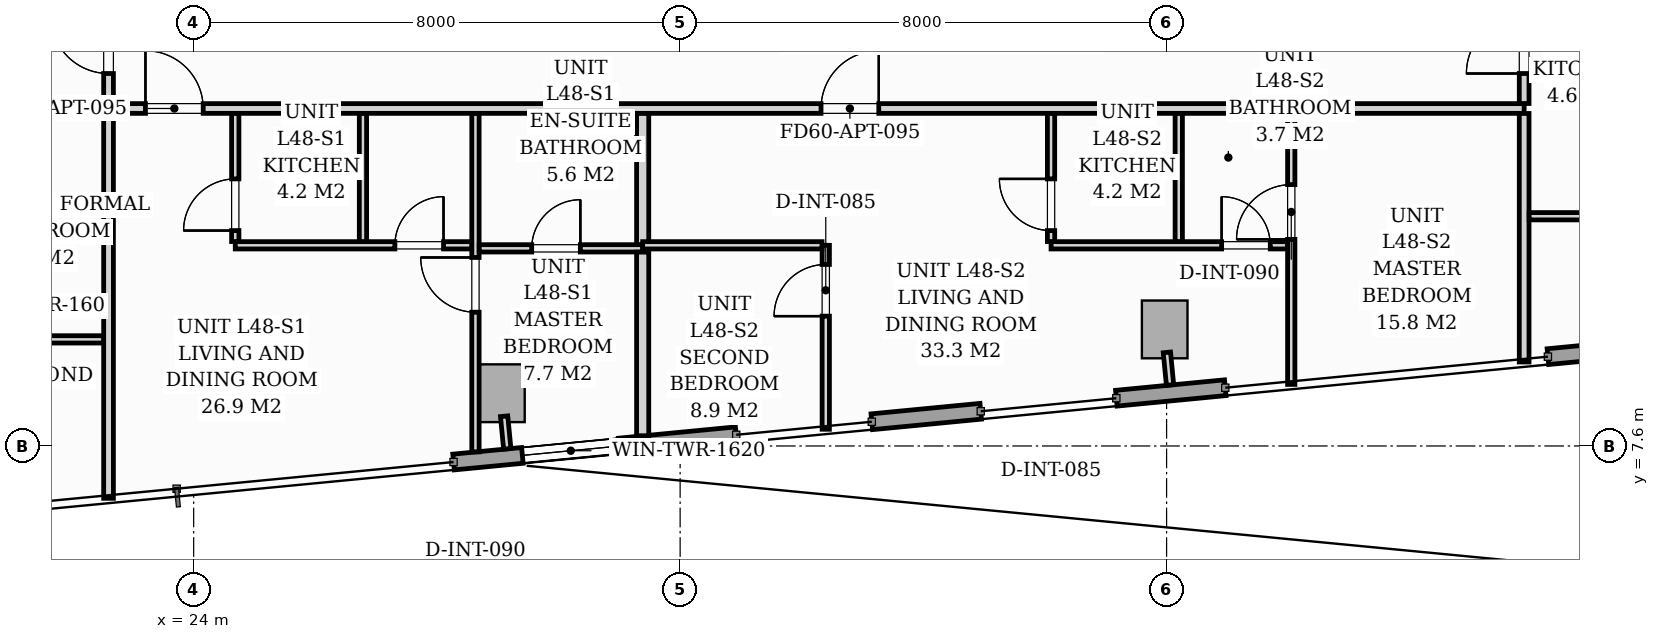
"""IFC4 building model, lengths in metres.
Left out: names, types, materials, properties, quantities, classifications, styles, units other than length and angle.
Written with IfcOpenShell. Run it as: python <this file> out.ifc"""

import sys

from ifc_helpers import new_model, si_unit, direction, frame, frame_2d, origin, origin_2d, place, context, subcontext, project, spatial, rectangle, extrude, source, transform, mapped, element, fill, save


model = new_model("IFC4")
c1 = context("Model", 3, precision=1e-05, world=origin(), true_north=direction((0.0, 1.0)))
c2 = subcontext(c1, "Body", "Model", "MODEL_VIEW")
j1 = project(units=[si_unit("LENGTHUNIT", "METRE"), si_unit("PLANEANGLEUNIT", "RADIAN")], contexts=[c1])
p1 = place(None, origin())
s1 = spatial("IfcSite", under=j1, at=p1, CompositionType="ELEMENT")
p2 = place(p1, origin())
s2 = spatial("IfcBuilding", under=s1, at=p2, CompositionType="ELEMENT")
p3 = place(p2, frame((0.0, 0.0, 167.8)))
s3 = spatial("IfcBuildingStorey", under=s2, at=p3, CompositionType="ELEMENT", Elevation=167.8)
m1 = source(origin(), c2, "Body", "SweptSolid", [
    extrude(rectangle(XDim=0.75, YDim=0.95, at=origin_2d()), origin(), (0.0, 0.0, 1.0), 5.194),
])
for number, where, z_axis, x_axis in (
    (1, (29.069, 8.467, 0.004), (0.0, 0.0, 1.0), (0.995, 0.096, 0.0)),
    (2, (39.969, 9.517, 0.004), (0.0, 0.0, 1.0), (0.995, 0.096, 0.0)),
):
    element("IfcColumn", number, at=place(p3, frame(where, z_axis=z_axis, x_axis=x_axis)), inside=s3, PredefinedType="COLUMN", context=c2, shape_type="MappedRepresentation", body=[
        mapped(m1, transform((0.0, 0.0, 0.0), scale=1.0)),
    ])
p4 = place(p3, frame((51.865, 9.607, 0.0), z_axis=(0.0, 0.0, 1.0), x_axis=(-0.995397720284, -0.09582994549, 0.0)))
e3 = element("IfcWall", 3, at=p4, inside=s3, PredefinedType="STANDARD", context=c2, shape_type="SweptSolid", body=[
    extrude(rectangle(XDim=5.62, YDim=0.26, at=frame_2d((2.81, 0.0))), origin(), (0.0, 0.0, 1.0), 4.94),
])
p5 = place(p3, frame((40.965, 8.558, 0.0), z_axis=(0.0, 0.0, 1.0), x_axis=(-0.995391866735, -0.09589072759, 0.0)))
e4 = element("IfcWall", 4, at=p5, inside=s3, PredefinedType="STANDARD", context=c2, shape_type="SweptSolid", body=[
    extrude(rectangle(XDim=1.8, YDim=0.26, at=frame_2d((0.9, 0.0))), origin(), (0.0, 0.0, 1.0), 4.94),
])
p6 = place(p3, frame((36.944, 8.171, 0.0), z_axis=(0.0, 0.0, 1.0), x_axis=(-0.995390619356, -0.0959036751, 0.0)))
e5 = element("IfcWall", 5, at=p6, inside=s3, PredefinedType="STANDARD", context=c2, shape_type="SweptSolid", body=[
    extrude(rectangle(XDim=1.8, YDim=0.26, at=frame_2d((0.9, 0.0))), origin(), (0.0, 0.0, 1.0), 4.94),
])
p7 = place(p3, frame((32.922, 7.784, 0.0), z_axis=(0.0, 0.0, 1.0), x_axis=(-0.995393403839, -0.095874770371, 0.0)))
e6 = element("IfcWall", 6, at=p7, inside=s3, PredefinedType="STANDARD", context=c2, shape_type="SweptSolid", body=[
    extrude(rectangle(XDim=4.67, YDim=0.26, at=frame_2d((2.335, 0.0))), origin(), (0.0, 0.0, 1.0), 4.94),
])
p8 = place(p7, frame((1.933, 0.0, 0.75)))
e7 = element("IfcOpeningElement", 7, at=p8, cuts=e6, PredefinedType="OPENING", context=c2, shape_type="SweptSolid", body=[
    extrude(rectangle(XDim=1.6, YDim=1.5, at=frame_2d((0.8, 0.75))), frame((0.0, 0.14, 0.0), z_axis=(0.0, -1.0, 0.0), x_axis=(1.0, 0.0, 0.0)), (0.0, 0.0, 1.0), 0.28),
])
p9 = place(p3, frame((22.6, 13.15, 0.0), z_axis=(0.0, 0.0, 1.0), x_axis=(1.0, 0.0, 0.0)))
e8 = element("IfcWall", 8, at=p9, inside=s3, PredefinedType="PARTITIONING", context=c2, shape_type="SweptSolid", body=[
    extrude(rectangle(XDim=23.28, YDim=0.16, at=frame_2d((11.64, 0.0))), origin(), (0.0, 0.0, 1.0), 4.94),
])
p10 = place(p9, frame((0.607, 0.0, 0.0)))
e9 = element("IfcOpeningElement", 9, at=p10, cuts=e8, PredefinedType="OPENING", context=c2, shape_type="SweptSolid", body=[
    extrude(rectangle(XDim=0.95, YDim=2.06, at=frame_2d((0.475, 1.03))), frame((0.0, 0.09, 0.0), z_axis=(0.0, -1.0, 0.0), x_axis=(1.0, 0.0, 0.0)), (0.0, 0.0, 1.0), 0.18),
])
p11 = place(p9, frame((11.717, 0.0, 0.0)))
e10 = element("IfcOpeningElement", 10, at=p11, cuts=e8, PredefinedType="OPENING", context=c2, shape_type="SweptSolid", body=[
    extrude(rectangle(XDim=0.95, YDim=2.06, at=frame_2d((0.475, 1.03))), frame((0.0, 0.09, 0.0), z_axis=(0.0, -1.0, 0.0), x_axis=(1.0, 0.0, 0.0)), (0.0, 0.0, 1.0), 0.18),
])
p12 = place(p3, frame((22.6, 6.74, 0.0), z_axis=(0.0, 0.0, 1.0), x_axis=(0.0, 1.0, 0.0)))
e11 = element("IfcWall", 11, at=p12, inside=s3, PredefinedType="PARTITIONING", context=c2, shape_type="SweptSolid", body=[
    extrude(rectangle(XDim=6.329, YDim=0.16, at=frame_2d((3.164, 0.0))), origin(), (0.0, 0.0, 1.0), 4.94),
])
p13 = place(p3, frame((22.6, 13.232, 0.0), z_axis=(0.0, 0.0, 1.0), x_axis=(0.0, 1.0, 0.0)))
e12 = element("IfcWall", 12, at=p13, inside=s3, PredefinedType="PARTITIONING", context=c2, shape_type="SweptSolid", body=[
    extrude(rectangle(XDim=11.832, YDim=0.16, at=frame_2d((5.916, 0.0))), origin(), (0.0, 0.0, 1.0), 4.94),
])
p14 = place(p13, frame((0.493, 0.0, 0.0)))
e13 = element("IfcOpeningElement", 13, at=p14, cuts=e12, PredefinedType="OPENING", context=c2, shape_type="SweptSolid", body=[
    extrude(rectangle(XDim=0.95, YDim=2.06, at=frame_2d((0.475, 1.03))), frame((0.0, 0.09, 0.0), z_axis=(0.0, -1.0, 0.0), x_axis=(1.0, 0.0, 0.0)), (0.0, 0.0, 1.0), 0.18),
])
p15 = place(p3, frame((45.88, 8.981, 0.0), z_axis=(0.0, 0.0, 1.0), x_axis=(0.0, 1.0, 0.0)))
e14 = element("IfcWall", 14, at=p15, inside=s3, PredefinedType="PARTITIONING", context=c2, shape_type="SweptSolid", body=[
    extrude(rectangle(XDim=4.087, YDim=0.16, at=frame_2d((2.043, 0.0))), origin(), (0.0, 0.0, 1.0), 4.94),
])
p16 = place(p3, frame((45.88, 13.232, 0.0), z_axis=(0.0, 0.0, 1.0), x_axis=(0.0, 1.0, 0.0)))
e15 = element("IfcWall", 15, at=p16, inside=s3, PredefinedType="PARTITIONING", context=c2, shape_type="SweptSolid", body=[
    extrude(rectangle(XDim=3.866, YDim=0.16, at=frame_2d((1.933, 0.0))), origin(), (0.0, 0.0, 1.0), 4.94),
])
p17 = place(p16, frame((0.493, 0.0, 0.0)))
e16 = element("IfcOpeningElement", 16, at=p17, cuts=e15, PredefinedType="OPENING", context=c2, shape_type="SweptSolid", body=[
    extrude(rectangle(XDim=0.95, YDim=2.06, at=frame_2d((0.475, 1.03))), frame((0.0, 0.09, 0.0), z_axis=(0.0, -1.0, 0.0), x_axis=(1.0, 0.0, 0.0)), (0.0, 0.0, 1.0), 0.18),
])
p18 = place(p3, frame((28.634, 7.503, 0.0), z_axis=(0.0, 0.0, 1.0), x_axis=(0.0, 1.0, 0.0)))
e17 = element("IfcWall", 17, at=p18, inside=s3, PredefinedType="PARTITIONING", context=c2, shape_type="SweptSolid", body=[
    extrude(rectangle(XDim=5.565, YDim=0.12, at=frame_2d((2.782, 0.0))), origin(), (0.0, 0.0, 1.0), 4.94),
])
p19 = place(p18, frame((2.297, 0.0, 0.0)))
e18 = element("IfcOpeningElement", 18, at=p19, cuts=e17, PredefinedType="OPENING", context=c2, shape_type="SweptSolid", body=[
    extrude(rectangle(XDim=0.9, YDim=2.05, at=frame_2d((0.45, 1.025))), frame((0.0, 0.07, 0.0), z_axis=(0.0, -1.0, 0.0), x_axis=(1.0, 0.0, 0.0)), (0.0, 0.0, 1.0), 0.14),
])
p20 = place(p3, frame((24.684, 10.9, 0.0), z_axis=(0.0, 0.0, 1.0), x_axis=(1.0, 0.0, 0.0)))
e19 = element("IfcWall", 19, at=p20, inside=s3, PredefinedType="PARTITIONING", context=c2, shape_type="SweptSolid", body=[
    extrude(rectangle(XDim=3.888, YDim=0.12, at=frame_2d((1.944, 0.0))), origin(), (0.0, 0.0, 1.0), 4.94),
])
p21 = place(p20, frame((2.625, 0.0, 0.0)))
e20 = element("IfcOpeningElement", 20, at=p21, cuts=e19, PredefinedType="OPENING", context=c2, shape_type="SweptSolid", body=[
    extrude(rectangle(XDim=0.8, YDim=2.02, at=frame_2d((0.4, 1.01))), frame((0.0, 0.07, 0.0), z_axis=(0.0, -1.0, 0.0), x_axis=(1.0, 0.0, 0.0)), (0.0, 0.0, 1.0), 0.14),
])
p22 = place(p3, frame((26.784, 10.962, 0.0), z_axis=(0.0, 0.0, 1.0), x_axis=(0.0, 1.0, 0.0)))
e21 = element("IfcWall", 21, at=p22, inside=s3, PredefinedType="PARTITIONING", context=c2, shape_type="SweptSolid", body=[
    extrude(rectangle(XDim=2.106, YDim=0.12, at=frame_2d((1.053, 0.0))), origin(), (0.0, 0.0, 1.0), 4.94),
])
p23 = place(p3, frame((24.684, 10.962, 0.0), z_axis=(0.0, 0.0, 1.0), x_axis=(0.0, 1.0, 0.0)))
e22 = element("IfcWall", 22, at=p23, inside=s3, PredefinedType="PARTITIONING", context=c2, shape_type="SweptSolid", body=[
    extrude(rectangle(XDim=2.106, YDim=0.12, at=frame_2d((1.053, 0.0))), origin(), (0.0, 0.0, 1.0), 4.94),
])
p24 = place(p23, frame((0.18, 0.0, 0.0)))
e23 = element("IfcOpeningElement", 23, at=p24, cuts=e22, PredefinedType="OPENING", context=c2, shape_type="SweptSolid", body=[
    extrude(rectangle(XDim=0.85, YDim=2.05, at=frame_2d((0.425, 1.025))), frame((0.0, 0.07, 0.0), z_axis=(0.0, -1.0, 0.0), x_axis=(1.0, 0.0, 0.0)), (0.0, 0.0, 1.0), 0.14),
])
p25 = place(p3, frame((28.696, 10.85, 0.0), z_axis=(0.0, 0.0, 1.0), x_axis=(1.0, 0.0, 0.0)))
e24 = element("IfcWall", 24, at=p25, inside=s3, PredefinedType="PARTITIONING", context=c2, shape_type="SweptSolid", body=[
    extrude(rectangle(XDim=2.688, YDim=0.12, at=frame_2d((1.344, 0.0))), origin(), (0.0, 0.0, 1.0), 4.94),
])
p26 = place(p25, frame((0.863, 0.0, 0.0)))
e25 = element("IfcOpeningElement", 25, at=p26, cuts=e24, PredefinedType="OPENING", context=c2, shape_type="SweptSolid", body=[
    extrude(rectangle(XDim=0.8, YDim=2.02, at=frame_2d((0.4, 1.01))), frame((0.0, 0.07, 0.0), z_axis=(0.0, -1.0, 0.0), x_axis=(1.0, 0.0, 0.0)), (0.0, 0.0, 1.0), 0.14),
])
p27 = place(p3, frame((31.384, 7.768, 0.0), z_axis=(0.0, 0.0, 1.0), x_axis=(0.0, 1.0, 0.0)))
e26 = element("IfcWall", 26, at=p27, inside=s3, PredefinedType="PARTITIONING", context=c2, shape_type="SweptSolid", body=[
    extrude(rectangle(XDim=3.02, YDim=0.2, at=frame_2d((1.51, 0.0))), origin(), (0.0, 0.0, 1.0), 4.94),
])
p28 = place(p3, frame((31.384, 10.912, 0.0), z_axis=(0.0, 0.0, 1.0), x_axis=(0.0, 1.0, 0.0)))
e27 = element("IfcWall", 27, at=p28, inside=s3, PredefinedType="PARTITIONING", context=c2, shape_type="SweptSolid", body=[
    extrude(rectangle(XDim=2.156, YDim=0.2, at=frame_2d((1.078, 0.0))), origin(), (0.0, 0.0, 1.0), 4.94),
])
p29 = place(p3, frame((42.05, 8.612, 0.0), z_axis=(0.0, 0.0, 1.0), x_axis=(0.0, 1.0, 0.0)))
e28 = element("IfcWall", 28, at=p29, inside=s3, PredefinedType="PARTITIONING", context=c2, shape_type="SweptSolid", body=[
    extrude(rectangle(XDim=4.456, YDim=0.12, at=frame_2d((2.228, 0.0))), origin(), (0.0, 0.0, 1.0), 4.94),
])
p30 = place(p29, frame((2.386, 0.0, 0.0)))
e29 = element("IfcOpeningElement", 29, at=p30, cuts=e28, PredefinedType="OPENING", context=c2, shape_type="SweptSolid", body=[
    extrude(rectangle(XDim=0.9, YDim=2.05, at=frame_2d((0.45, 1.025))), frame((0.0, 0.07, 0.0), z_axis=(0.0, -1.0, 0.0), x_axis=(1.0, 0.0, 0.0)), (0.0, 0.0, 1.0), 0.14),
])
p31 = place(p3, frame((38.1, 10.9, 0.0), z_axis=(0.0, 0.0, 1.0), x_axis=(1.0, 0.0, 0.0)))
e30 = element("IfcWall", 30, at=p31, inside=s3, PredefinedType="PARTITIONING", context=c2, shape_type="SweptSolid", body=[
    extrude(rectangle(XDim=3.888, YDim=0.12, at=frame_2d((1.944, 0.0))), origin(), (0.0, 0.0, 1.0), 4.94),
])
p32 = place(p31, frame((2.805, 0.0, 0.0)))
e31 = element("IfcOpeningElement", 31, at=p32, cuts=e30, PredefinedType="OPENING", context=c2, shape_type="SweptSolid", body=[
    extrude(rectangle(XDim=0.8, YDim=2.02, at=frame_2d((0.4, 1.01))), frame((0.0, 0.07, 0.0), z_axis=(0.0, -1.0, 0.0), x_axis=(1.0, 0.0, 0.0)), (0.0, 0.0, 1.0), 0.14),
])
p33 = place(p3, frame((40.2, 10.962, 0.0), z_axis=(0.0, 0.0, 1.0), x_axis=(0.0, 1.0, 0.0)))
e32 = element("IfcWall", 32, at=p33, inside=s3, PredefinedType="PARTITIONING", context=c2, shape_type="SweptSolid", body=[
    extrude(rectangle(XDim=2.106, YDim=0.12, at=frame_2d((1.053, 0.0))), origin(), (0.0, 0.0, 1.0), 4.94),
])
p34 = place(p3, frame((38.1, 10.962, 0.0), z_axis=(0.0, 0.0, 1.0), x_axis=(0.0, 1.0, 0.0)))
e33 = element("IfcWall", 33, at=p34, inside=s3, PredefinedType="PARTITIONING", context=c2, shape_type="SweptSolid", body=[
    extrude(rectangle(XDim=2.106, YDim=0.12, at=frame_2d((1.053, 0.0))), origin(), (0.0, 0.0, 1.0), 4.94),
])
p35 = place(p34, frame((0.18, 0.0, 0.0)))
e34 = element("IfcOpeningElement", 34, at=p35, cuts=e33, PredefinedType="OPENING", context=c2, shape_type="SweptSolid", body=[
    extrude(rectangle(XDim=0.85, YDim=2.05, at=frame_2d((0.425, 1.025))), frame((0.0, 0.07, 0.0), z_axis=(0.0, -1.0, 0.0), x_axis=(1.0, 0.0, 0.0)), (0.0, 0.0, 1.0), 0.14),
])
p36 = place(p3, frame((34.395, 7.875, 0.0), z_axis=(0.0, 0.0, 1.0), x_axis=(0.0, 1.0, 0.0)))
e35 = element("IfcWall", 35, at=p36, inside=s3, PredefinedType="PARTITIONING", context=c2, shape_type="SweptSolid", body=[
    extrude(rectangle(XDim=3.025, YDim=0.12, at=frame_2d((1.512, 0.0))), origin(), (0.0, 0.0, 1.0), 4.94),
])
p37 = place(p36, frame((1.86, 0.0, 0.0)))
e36 = element("IfcOpeningElement", 36, at=p37, cuts=e35, PredefinedType="OPENING", context=c2, shape_type="SweptSolid", body=[
    extrude(rectangle(XDim=0.85, YDim=2.05, at=frame_2d((0.425, 1.025))), frame((0.0, 0.07, 0.0), z_axis=(0.0, -1.0, 0.0), x_axis=(1.0, 0.0, 0.0)), (0.0, 0.0, 1.0), 0.14),
])
p38 = place(p3, frame((31.384, 10.9, 0.0), z_axis=(0.0, 0.0, 1.0), x_axis=(1.0, 0.0, 0.0)))
e37 = element("IfcWall", 37, at=p38, inside=s3, PredefinedType="PARTITIONING", context=c2, shape_type="SweptSolid", body=[
    extrude(rectangle(XDim=2.949, YDim=0.12, at=frame_2d((1.475, 0.0))), origin(), (0.0, 0.0, 1.0), 4.94),
])
p39 = place(p3, frame((14.63, 9.353, 0.0), z_axis=(0.0, 0.0, 1.0), x_axis=(1.0, 0.0, 0.0)))
e38 = element("IfcWall", 38, at=p39, inside=s3, PredefinedType="PARTITIONING", context=c2, shape_type="SweptSolid", body=[
    extrude(rectangle(XDim=7.888, YDim=0.12, at=frame_2d((3.944, 0.0))), origin(), (0.0, 0.0, 1.0), 4.94),
])
p40 = place(p39, frame((4.26, 0.0, 0.0)))
e39 = element("IfcOpeningElement", 39, at=p40, cuts=e38, PredefinedType="OPENING", context=c2, shape_type="SweptSolid", body=[
    extrude(rectangle(XDim=0.55, YDim=2.0, at=frame_2d((0.275, 1.0))), frame((0.0, 0.07, 0.0), z_axis=(0.0, -1.0, 0.0), x_axis=(1.0, 0.0, 0.0)), (0.0, 0.0, 1.0), 0.14),
])
p41 = place(p3, frame((14.416, 11.578, 0.0), z_axis=(0.0, 0.0, 1.0), x_axis=(1.0, 0.0, 0.0)))
e40 = element("IfcWall", 40, at=p41, inside=s3, PredefinedType="PARTITIONING", context=c2, shape_type="SweptSolid", body=[
    extrude(rectangle(XDim=8.103, YDim=0.12, at=frame_2d((4.051, 0.0))), origin(), (0.0, 0.0, 1.0), 4.94),
])
p42 = place(p41, frame((3.529, 0.0, 0.0)))
e41 = element("IfcOpeningElement", 41, at=p42, cuts=e40, PredefinedType="OPENING", context=c2, shape_type="SweptSolid", body=[
    extrude(rectangle(XDim=0.85, YDim=2.05, at=frame_2d((0.425, 1.025))), frame((0.0, 0.07, 0.0), z_axis=(0.0, -1.0, 0.0), x_axis=(1.0, 0.0, 0.0)), (0.0, 0.0, 1.0), 0.14),
])
p43 = place(p3, frame((45.962, 11.378, 0.0), z_axis=(0.0, 0.0, 1.0), x_axis=(1.0, 0.0, 0.0)))
e42 = element("IfcWall", 42, at=p43, inside=s3, PredefinedType="PARTITIONING", context=c2, shape_type="SweptSolid", body=[
    extrude(rectangle(XDim=16.671, YDim=0.12, at=frame_2d((8.335, 0.0))), origin(), (0.0, 0.0, 1.0), 4.383),
])
p44 = place(p43, frame((6.186, 0.0, 0.0)))
e43 = element("IfcOpeningElement", 43, at=p44, cuts=e42, PredefinedType="OPENING", context=c2, shape_type="SweptSolid", body=[
    extrude(rectangle(XDim=0.85, YDim=2.05, at=frame_2d((0.425, 1.025))), frame((0.0, 0.07, 0.0), z_axis=(0.0, -1.0, 0.0), x_axis=(1.0, 0.0, 0.0)), (0.0, 0.0, 1.0), 0.14),
])
p45 = place(p3, frame((29.105, 8.089, 0.0), z_axis=(0.0, 0.0, 1.0), x_axis=(0.095772948675, -0.995403205893, 0.0)))
e44 = element("IfcWall", 44, at=p45, inside=s3, PredefinedType="PARTITIONING", context=c2, shape_type="SweptSolid", body=[
    extrude(rectangle(XDim=0.538, YDim=0.12, at=frame_2d((0.269, 0.0))), origin(), (0.0, 0.0, 1.0), 4.94),
])
p46 = place(p3, frame((40.005, 9.139, 0.0), z_axis=(0.0, 0.0, 1.0), x_axis=(0.095729696592, -0.995407366454, 0.0)))
e45 = element("IfcWall", 45, at=p46, inside=s3, PredefinedType="PARTITIONING", context=c2, shape_type="SweptSolid", body=[
    extrude(rectangle(XDim=0.538, YDim=0.12, at=frame_2d((0.269, 0.0))), origin(), (0.0, 0.0, 1.0), 4.94),
])
m2 = source(origin(), c2, "Body", "SweptSolid", [
    extrude(rectangle(XDim=1.6, YDim=1.5, at=frame_2d((0.8, 0.75))), frame((0.0, 0.03, 0.0), z_axis=(0.0, -1.0, 0.0), x_axis=(1.0, 0.0, 0.0)), (0.0, 0.0, 1.0), 0.06),
])
p47 = place(p8, origin())
e46 = element("IfcWindow", 46, at=p47, inside=s3, PartitioningType="SINGLE_PANEL", PredefinedType="WINDOW", context=c2, shape_type="MappedRepresentation", body=[
    mapped(m2, transform((0.0, 0.0, 0.0), scale=1.0)),
])
fill(e7, e46)
m3 = source(origin(), c2, "Body", "SweptSolid", [
    extrude(rectangle(XDim=0.8, YDim=2.02, at=frame_2d((0.4, 1.01))), frame((0.0, 0.025, 0.0), z_axis=(0.0, -1.0, 0.0), x_axis=(1.0, 0.0, 0.0)), (0.0, 0.0, 1.0), 0.05),
])
p48 = place(p26, origin())
e47 = element("IfcDoor", 47, at=p48, inside=s3, OperationType="SINGLE_SWING_RIGHT", PredefinedType="DOOR", context=c2, shape_type="MappedRepresentation", body=[
    mapped(m3, transform((0.0, 0.0, 0.0), scale=1.0)),
])
fill(e25, e47)
m4 = source(origin(), c2, "Body", "SweptSolid", [
    extrude(rectangle(XDim=0.95, YDim=2.06, at=frame_2d((0.475, 1.03))), frame((0.0, 0.025, 0.0), z_axis=(0.0, -1.0, 0.0), x_axis=(1.0, 0.0, 0.0)), (0.0, 0.0, 1.0), 0.05),
])
p49 = place(p10, origin())
e48 = element("IfcDoor", 48, at=p49, inside=s3, OperationType="SINGLE_SWING_LEFT", PredefinedType="DOOR", context=c2, shape_type="MappedRepresentation", body=[
    mapped(m4, transform((0.0, 0.0, 0.0), scale=1.0)),
])
fill(e9, e48)
m5 = source(origin(), c2, "Body", "SweptSolid", [
    extrude(rectangle(XDim=0.9, YDim=2.05, at=frame_2d((0.45, 1.025))), frame((0.0, 0.025, 0.0), z_axis=(0.0, -1.0, 0.0), x_axis=(1.0, 0.0, 0.0)), (0.0, 0.0, 1.0), 0.05),
])
p50 = place(p19, origin())
e49 = element("IfcDoor", 49, at=p50, inside=s3, OperationType="SINGLE_SWING_RIGHT", PredefinedType="DOOR", context=c2, shape_type="MappedRepresentation", body=[
    mapped(m5, transform((0.0, 0.0, 0.0), scale=1.0)),
])
fill(e18, e49)
m6 = source(origin(), c2, "Body", "SweptSolid", [
    extrude(rectangle(XDim=0.85, YDim=2.05, at=frame_2d((0.425, 1.025))), frame((0.0, 0.025, 0.0), z_axis=(0.0, -1.0, 0.0), x_axis=(1.0, 0.0, 0.0)), (0.0, 0.0, 1.0), 0.05),
])
p51 = place(p24, origin())
e50 = element("IfcDoor", 50, at=p51, inside=s3, OperationType="SINGLE_SWING_LEFT", PredefinedType="DOOR", context=c2, shape_type="MappedRepresentation", body=[
    mapped(m6, transform((0.0, 0.0, 0.0), scale=1.0)),
])
fill(e23, e50)
p52 = place(p21, origin())
e51 = element("IfcDoor", 51, at=p52, inside=s3, OperationType="SINGLE_SWING_RIGHT", PredefinedType="DOOR", context=c2, shape_type="MappedRepresentation", body=[
    mapped(m3, transform((0.0, 0.0, 0.0), scale=1.0)),
])
fill(e20, e51)
p53 = place(p37, origin())
e52 = element("IfcDoor", 52, at=p53, inside=s3, OperationType="SINGLE_SWING_LEFT", PredefinedType="DOOR", context=c2, shape_type="MappedRepresentation", body=[
    mapped(m6, transform((0.0, 0.0, 0.0), scale=1.0)),
])
fill(e36, e52)
p54 = place(p11, origin())
e53 = element("IfcDoor", 53, at=p54, inside=s3, OperationType="SINGLE_SWING_RIGHT", PredefinedType="DOOR", context=c2, shape_type="MappedRepresentation", body=[
    mapped(m4, transform((0.0, 0.0, 0.0), scale=1.0)),
])
fill(e10, e53)
p55 = place(p30, origin())
e54 = element("IfcDoor", 54, at=p55, inside=s3, OperationType="SINGLE_SWING_LEFT", PredefinedType="DOOR", context=c2, shape_type="MappedRepresentation", body=[
    mapped(m5, transform((0.0, 0.0, 0.0), scale=1.0)),
])
fill(e29, e54)
p56 = place(p35, origin())
e55 = element("IfcDoor", 55, at=p56, inside=s3, OperationType="SINGLE_SWING_RIGHT", PredefinedType="DOOR", context=c2, shape_type="MappedRepresentation", body=[
    mapped(m6, transform((0.0, 0.0, 0.0), scale=1.0)),
])
fill(e34, e55)
p57 = place(p32, origin())
e56 = element("IfcDoor", 56, at=p57, inside=s3, OperationType="SINGLE_SWING_LEFT", PredefinedType="DOOR", context=c2, shape_type="MappedRepresentation", body=[
    mapped(m3, transform((0.0, 0.0, 0.0), scale=1.0)),
])
fill(e31, e56)
p58 = place(p14, origin())
e57 = element("IfcDoor", 57, at=p58, inside=s3, OperationType="SINGLE_SWING_RIGHT", PredefinedType="DOOR", context=c2, shape_type="MappedRepresentation", body=[
    mapped(m4, transform((0.0, 0.0, 0.0), scale=1.0)),
])
fill(e13, e57)
p59 = place(p17, origin())
e58 = element("IfcDoor", 58, at=p59, inside=s3, OperationType="SINGLE_SWING_LEFT", PredefinedType="DOOR", context=c2, shape_type="MappedRepresentation", body=[
    mapped(m4, transform((0.0, 0.0, 0.0), scale=1.0)),
])
fill(e16, e58)
save(model, sys.argv[1])
